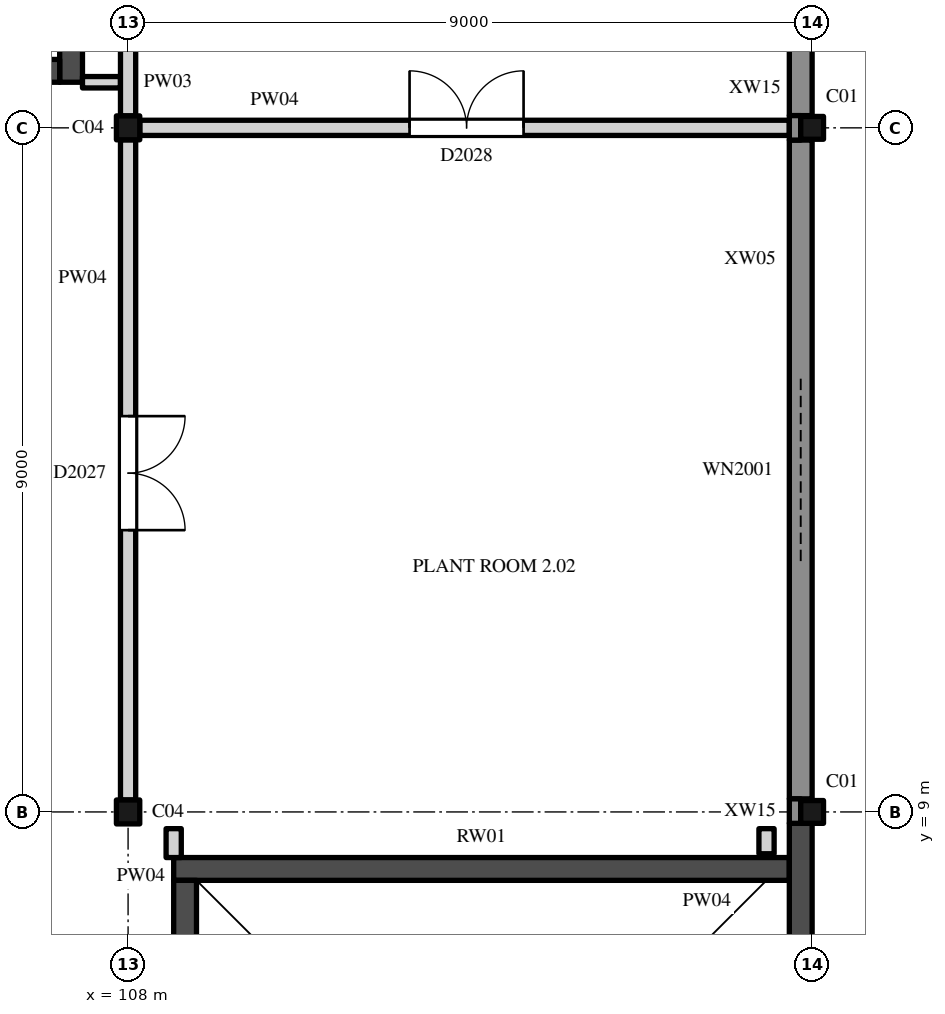
"""IFC4 building model, lengths in metres.
Left out: names, types, materials, properties, quantities, classifications, styles, units other than length and angle.
Written with IfcOpenShell. Run it as: python <this file> out.ifc"""

import sys

from ifc_helpers import new_model, si_unit, direction, frame, frame_2d, origin, origin_2d, place, context, subcontext, project, spatial, rectangle, hollow_rectangle, i_section, extrude, element, fill, save


model = new_model("IFC4")
c1 = context("Model", 3, precision=1e-05, world=origin(), true_north=direction((0.0, 1.0)))
c2 = subcontext(c1, "Body", "Model", "MODEL_VIEW")
j1 = project(units=[si_unit("LENGTHUNIT", "METRE"), si_unit("PLANEANGLEUNIT", "RADIAN")], contexts=[c1])
p1 = place(None, origin())
s1 = spatial("IfcSite", under=j1, at=p1, CompositionType="ELEMENT")
p2 = place(p1, origin())
s2 = spatial("IfcBuilding", under=s1, at=p2, CompositionType="ELEMENT")
p3 = place(p2, frame((0.0, 0.0, 11.0)))
s3 = spatial("IfcBuildingStorey", under=s2, at=p3, CompositionType="ELEMENT", Elevation=11.0)
p4 = place(p3, frame((108.0, 9.0, 0.0), z_axis=(0.0, 0.0, 1.0), x_axis=(1.0, 0.0, 0.0)))
e1 = element("IfcColumn", 1, at=p4, inside=s3, PredefinedType="COLUMN", context=c2, shape_type="SweptSolid", body=[
    extrude(i_section(OverallWidth=0.307, OverallDepth=0.315, WebThickness=0.012, FlangeThickness=0.019, FilletRadius=0.017, at=origin_2d()), origin(), (0.0, 0.0, 1.0), 5.0),
])
p5 = place(p3, frame((117.0, 9.0, 0.0), z_axis=(0.0, 0.0, 1.0), x_axis=(1.0, 0.0, 0.0)))
e2 = element("IfcColumn", 2, at=p5, inside=s3, PredefinedType="COLUMN", context=c2, shape_type="SweptSolid", body=[
    extrude(hollow_rectangle(XDim=0.3, YDim=0.3, WallThickness=0.012, InnerFilletRadius=0.019, OuterFilletRadius=0.031, at=origin_2d()), origin(), (0.0, 0.0, 1.0), 5.0),
])
p6 = place(p3, frame((108.0, 18.0, 0.0), z_axis=(0.0, 0.0, 1.0), x_axis=(1.0, 0.0, 0.0)))
e3 = element("IfcColumn", 3, at=p6, inside=s3, PredefinedType="COLUMN", context=c2, shape_type="SweptSolid", body=[
    extrude(i_section(OverallWidth=0.307, OverallDepth=0.315, WebThickness=0.012, FlangeThickness=0.019, FilletRadius=0.017, at=origin_2d()), origin(), (0.0, 0.0, 1.0), 5.0),
])
p7 = place(p3, frame((117.0, 18.0, 0.0), z_axis=(0.0, 0.0, 1.0), x_axis=(1.0, 0.0, 0.0)))
e4 = element("IfcColumn", 4, at=p7, inside=s3, PredefinedType="COLUMN", context=c2, shape_type="SweptSolid", body=[
    extrude(hollow_rectangle(XDim=0.3, YDim=0.3, WallThickness=0.012, InnerFilletRadius=0.019, OuterFilletRadius=0.031, at=origin_2d()), origin(), (0.0, 0.0, 1.0), 5.0),
])
p8 = place(p3, frame((108.6, 8.25, 0.0), z_axis=(0.0, 0.0, 1.0), x_axis=(1.0, 0.0, 0.0)))
e5 = element("IfcWall", 5, at=p8, inside=s3, PredefinedType="SHEAR", context=c2, shape_type="SweptSolid", body=[
    extrude(rectangle(XDim=8.1, YDim=0.3, at=frame_2d((4.05, 0.0))), origin(), (0.0, 0.0, 1.0), 4.825),
])
p9 = place(p3, frame((108.75, 0.3, 0.0), z_axis=(0.0, 0.0, 1.0), x_axis=(0.0, 1.0, 0.0)))
e6 = element("IfcWall", 6, at=p9, inside=s3, PredefinedType="SHEAR", context=c2, shape_type="SweptSolid", body=[
    extrude(rectangle(XDim=7.8, YDim=0.3, at=frame_2d((3.9, 0.0))), origin(), (0.0, 0.0, 1.0), 4.825),
])
p10 = place(p9, frame((3.6, 0.0, 0.0)))
e7 = element("IfcOpeningElement", 7, at=p10, cuts=e6, PredefinedType="OPENING", context=c2, shape_type="SweptSolid", body=[
    extrude(rectangle(XDim=1.2, YDim=2.1, at=frame_2d((0.6, 1.05))), frame((0.0, 0.16, 0.0), z_axis=(0.0, -1.0, 0.0), x_axis=(1.0, 0.0, 0.0)), (0.0, 0.0, 1.0), 0.32),
])
p11 = place(p3, frame((116.85, 0.15, 0.0), z_axis=(0.0, 0.0, 1.0), x_axis=(0.0, 1.0, 0.0)))
e8 = element("IfcWall", 8, at=p11, inside=s3, PredefinedType="SHEAR", context=c2, shape_type="SweptSolid", body=[
    extrude(rectangle(XDim=8.7, YDim=0.3, at=frame_2d((4.35, 0.0))), origin(), (0.0, 0.0, 1.0), 4.825),
])
p12 = place(p3, frame((107.25, 18.6, 0.0), z_axis=(0.0, 0.0, 1.0), x_axis=(0.0, 1.0, 0.0)))
e9 = element("IfcWall", 9, at=p12, inside=s3, PredefinedType="SHEAR", context=c2, shape_type="SweptSolid", body=[
    extrude(rectangle(XDim=4.8, YDim=0.3, at=frame_2d((2.4, 0.0))), origin(), (0.0, 0.0, 1.0), 4.825),
])
p13 = place(p3, frame((103.65, 18.75, 0.0), z_axis=(0.0, 0.0, 1.0), x_axis=(1.0, 0.0, 0.0)))
e10 = element("IfcWall", 10, at=p13, inside=s3, PredefinedType="SHEAR", context=c2, shape_type="SweptSolid", body=[
    extrude(rectangle(XDim=3.45, YDim=0.3, at=frame_2d((1.725, 0.0))), origin(), (0.0, 0.0, 1.0), 4.825),
])
p14 = place(p13, frame((0.75, 0.0, 0.0)))
e11 = element("IfcOpeningElement", 11, at=p14, cuts=e10, PredefinedType="OPENING", context=c2, shape_type="SweptSolid", body=[
    extrude(rectangle(XDim=2.1, YDim=2.4, at=frame_2d((1.05, 1.2))), frame((0.0, 0.16, 0.0), z_axis=(0.0, -1.0, 0.0), x_axis=(1.0, 0.0, 0.0)), (0.0, 0.0, 1.0), 0.32),
])
p15 = place(p3, frame((116.85, 9.172, 0.0), z_axis=(0.0, 0.0, 1.0), x_axis=(0.0, 1.0, 0.0)))
e12 = element("IfcWall", 12, at=p15, inside=s3, PredefinedType="SOLIDWALL", context=c2, shape_type="SweptSolid", body=[
    extrude(rectangle(XDim=8.667, YDim=0.3, at=frame_2d((4.333, 0.0))), origin(), (0.0, 0.0, 1.0), 4.825),
])
p16 = place(p15, frame((3.128, 0.0, 0.9)))
e13 = element("IfcOpeningElement", 13, at=p16, cuts=e12, PredefinedType="OPENING", context=c2, shape_type="SweptSolid", body=[
    extrude(rectangle(XDim=2.4, YDim=1.8, at=frame_2d((1.2, 0.9))), frame((0.0, 0.16, 0.0), z_axis=(0.0, -1.0, 0.0), x_axis=(1.0, 0.0, 0.0)), (0.0, 0.0, 1.0), 0.32),
])
p17 = place(p3, frame((116.85, 18.161, 0.0), z_axis=(0.0, 0.0, 1.0), x_axis=(0.0, 1.0, 0.0)))
e14 = element("IfcWall", 14, at=p17, inside=s3, PredefinedType="SOLIDWALL", context=c2, shape_type="SweptSolid", body=[
    extrude(rectangle(XDim=8.667, YDim=0.3, at=frame_2d((4.333, 0.0))), origin(), (0.0, 0.0, 1.0), 4.825),
])
p18 = place(p17, frame((1.489, 0.0, 1.2)))
e15 = element("IfcOpeningElement", 15, at=p18, cuts=e14, PredefinedType="OPENING", context=c2, shape_type="SweptSolid", body=[
    extrude(rectangle(XDim=1.2, YDim=1.5, at=frame_2d((0.6, 0.75))), frame((0.0, 0.16, 0.0), z_axis=(0.0, -1.0, 0.0), x_axis=(1.0, 0.0, 0.0)), (0.0, 0.0, 1.0), 0.32),
])
p19 = place(p17, frame((5.989, 0.0, 1.2)))
e16 = element("IfcOpeningElement", 16, at=p19, cuts=e14, PredefinedType="OPENING", context=c2, shape_type="SweptSolid", body=[
    extrude(rectangle(XDim=1.2, YDim=1.5, at=frame_2d((0.6, 0.75))), frame((0.0, 0.16, 0.0), z_axis=(0.0, -1.0, 0.0), x_axis=(1.0, 0.0, 0.0)), (0.0, 0.0, 1.0), 0.32),
])
p20 = place(p3, frame((116.775, 8.85, 0.0), z_axis=(0.0, 0.0, 1.0), x_axis=(0.0, 1.0, 0.0)))
e17 = element("IfcWall", 17, at=p20, inside=s3, PredefinedType="SOLIDWALL", context=c2, shape_type="SweptSolid", body=[
    extrude(rectangle(XDim=0.322, YDim=0.15, at=frame_2d((0.161, 0.0))), origin(), (0.0, 0.0, 1.0), 4.825),
])
p21 = place(p3, frame((116.775, 17.839, 0.0), z_axis=(0.0, 0.0, 1.0), x_axis=(0.0, 1.0, 0.0)))
e18 = element("IfcWall", 18, at=p21, inside=s3, PredefinedType="SOLIDWALL", context=c2, shape_type="SweptSolid", body=[
    extrude(rectangle(XDim=0.322, YDim=0.15, at=frame_2d((0.161, 0.0))), origin(), (0.0, 0.0, 1.0), 4.825),
])
for number, where, z_axis, x_axis in (
    (19, (109.5, 11.325, 5.0), (0.0, 0.0, 1.0), (1.0, 0.0, 0.0)),
    (20, (109.5, 15.675, 5.0), (0.0, 0.0, 1.0), (1.0, 0.0, 0.0)),
):
    element("IfcWall", number, at=place(p3, frame(where, z_axis=z_axis, x_axis=x_axis)), inside=s3, PredefinedType="PARAPET", context=c2, shape_type="SweptSolid", body=[
        extrude(rectangle(XDim=6.0, YDim=0.15, at=frame_2d((3.0, 0.0))), origin(), (0.0, 0.0, 1.0), 0.5),
    ])
for number, where, z_axis, x_axis in (
    (21, (109.575, 11.4, 5.0), (0.0, 0.0, 1.0), (0.0, 1.0, 0.0)),
    (22, (115.425, 11.4, 5.0), (0.0, 0.0, 1.0), (0.0, 1.0, 0.0)),
):
    element("IfcWall", number, at=place(p3, frame(where, z_axis=z_axis, x_axis=x_axis)), inside=s3, PredefinedType="PARAPET", context=c2, shape_type="SweptSolid", body=[
        extrude(rectangle(XDim=4.2, YDim=0.15, at=frame_2d((2.1, 0.0))), origin(), (0.0, 0.0, 1.0), 0.5),
    ])
p22 = place(p3, frame((108.154, 18.0, 0.0), z_axis=(0.0, 0.0, 1.0), x_axis=(1.0, 0.0, 0.0)))
e23 = element("IfcWall", 23, at=p22, inside=s3, PredefinedType="PARTITIONING", context=c2, shape_type="SweptSolid", body=[
    extrude(rectangle(XDim=8.546, YDim=0.2, at=frame_2d((4.273, 0.0))), origin(), (0.0, 0.0, 1.0), 4.419),
])
p23 = place(p22, frame((3.55, 0.0, 0.0)))
e24 = element("IfcOpeningElement", 24, at=p23, cuts=e23, PredefinedType="OPENING", context=c2, shape_type="SweptSolid", body=[
    extrude(rectangle(XDim=1.5, YDim=2.4, at=frame_2d((0.75, 1.2))), frame((0.0, 0.11, 0.0), z_axis=(0.0, -1.0, 0.0), x_axis=(1.0, 0.0, 0.0)), (0.0, 0.0, 1.0), 0.22),
])
p24 = place(p3, frame((107.4, 18.6, 0.0), z_axis=(0.0, 0.0, 1.0), x_axis=(1.0, 0.0, 0.0)))
e25 = element("IfcWall", 25, at=p24, inside=s3, PredefinedType="PARTITIONING", context=c2, shape_type="SweptSolid", body=[
    extrude(rectangle(XDim=0.5, YDim=0.15, at=frame_2d((0.25, 0.0))), origin(), (0.0, 0.0, 1.0), 4.825),
])
p25 = place(p3, frame((108.0, 9.157, 0.0), z_axis=(0.0, 0.0, 1.0), x_axis=(0.0, 1.0, 0.0)))
e26 = element("IfcWall", 26, at=p25, inside=s3, PredefinedType="PARTITIONING", context=c2, shape_type="SweptSolid", body=[
    extrude(rectangle(XDim=8.686, YDim=0.2, at=frame_2d((4.343, 0.0))), origin(), (0.0, 0.0, 1.0), 4.297),
])
p26 = place(p25, frame((3.55, 0.0, 0.0)))
e27 = element("IfcOpeningElement", 27, at=p26, cuts=e26, PredefinedType="OPENING", context=c2, shape_type="SweptSolid", body=[
    extrude(rectangle(XDim=1.5, YDim=2.4, at=frame_2d((0.75, 1.2))), frame((0.0, 0.11, 0.0), z_axis=(0.0, -1.0, 0.0), x_axis=(1.0, 0.0, 0.0)), (0.0, 0.0, 1.0), 0.22),
])
p27 = place(p3, frame((108.0, 18.157, 0.0), z_axis=(0.0, 0.0, 1.0), x_axis=(0.0, 1.0, 0.0)))
e28 = element("IfcWall", 28, at=p27, inside=s3, PredefinedType="PARTITIONING", context=c2, shape_type="SweptSolid", body=[
    extrude(rectangle(XDim=8.686, YDim=0.2, at=frame_2d((4.343, 0.0))), origin(), (0.0, 0.0, 1.0), 4.297),
])
p28 = place(p3, frame((108.6, 8.4, 0.0), z_axis=(0.0, 0.0, 1.0), x_axis=(0.0, 1.0, 0.0)))
e29 = element("IfcWall", 29, at=p28, inside=s3, PredefinedType="PARTITIONING", context=c2, shape_type="SweptSolid", body=[
    extrude(rectangle(XDim=0.38, YDim=0.2, at=frame_2d((0.19, 0.0))), origin(), (0.0, 0.0, 1.0), 4.825),
])
p29 = place(p3, frame((116.4, 8.45, 0.0), z_axis=(0.0, 0.0, 1.0), x_axis=(0.0, 1.0, 0.0)))
e30 = element("IfcWall", 30, at=p29, inside=s3, PredefinedType="PARTITIONING", context=c2, shape_type="SweptSolid", body=[
    extrude(rectangle(XDim=0.33, YDim=0.2, at=frame_2d((0.165, 0.0))), origin(), (0.0, 0.0, 1.0), 4.825),
])
p30 = place(p16, origin())
e31 = element("IfcWindow", 31, at=p30, inside=s3, PartitioningType="TRIPLE_PANEL_VERTICAL", PredefinedType="WINDOW", context=c2, shape_type="SweptSolid", body=[
    extrude(rectangle(XDim=2.4, YDim=1.8, at=frame_2d((1.2, 0.9))), frame((0.0, 0.03, 0.0), z_axis=(0.0, -1.0, 0.0), x_axis=(1.0, 0.0, 0.0)), (0.0, 0.0, 1.0), 0.06),
])
fill(e13, e31)
p31 = place(p26, origin())
e32 = element("IfcDoor", 32, at=p31, inside=s3, OperationType="DOUBLE_DOOR_SINGLE_SWING", PredefinedType="DOOR", context=c2, shape_type="SweptSolid", body=[
    extrude(rectangle(XDim=1.5, YDim=2.4, at=frame_2d((0.75, 1.2))), frame((0.0, 0.025, 0.0), z_axis=(0.0, -1.0, 0.0), x_axis=(1.0, 0.0, 0.0)), (0.0, 0.0, 1.0), 0.05),
])
fill(e27, e32)
p32 = place(p23, origin())
e33 = element("IfcDoor", 33, at=p32, inside=s3, OperationType="DOUBLE_DOOR_SINGLE_SWING", PredefinedType="DOOR", context=c2, shape_type="SweptSolid", body=[
    extrude(rectangle(XDim=1.5, YDim=2.4, at=frame_2d((0.75, 1.2))), frame((0.0, 0.025, 0.0), z_axis=(0.0, -1.0, 0.0), x_axis=(1.0, 0.0, 0.0)), (0.0, 0.0, 1.0), 0.05),
])
fill(e24, e33)
save(model, sys.argv[1])
